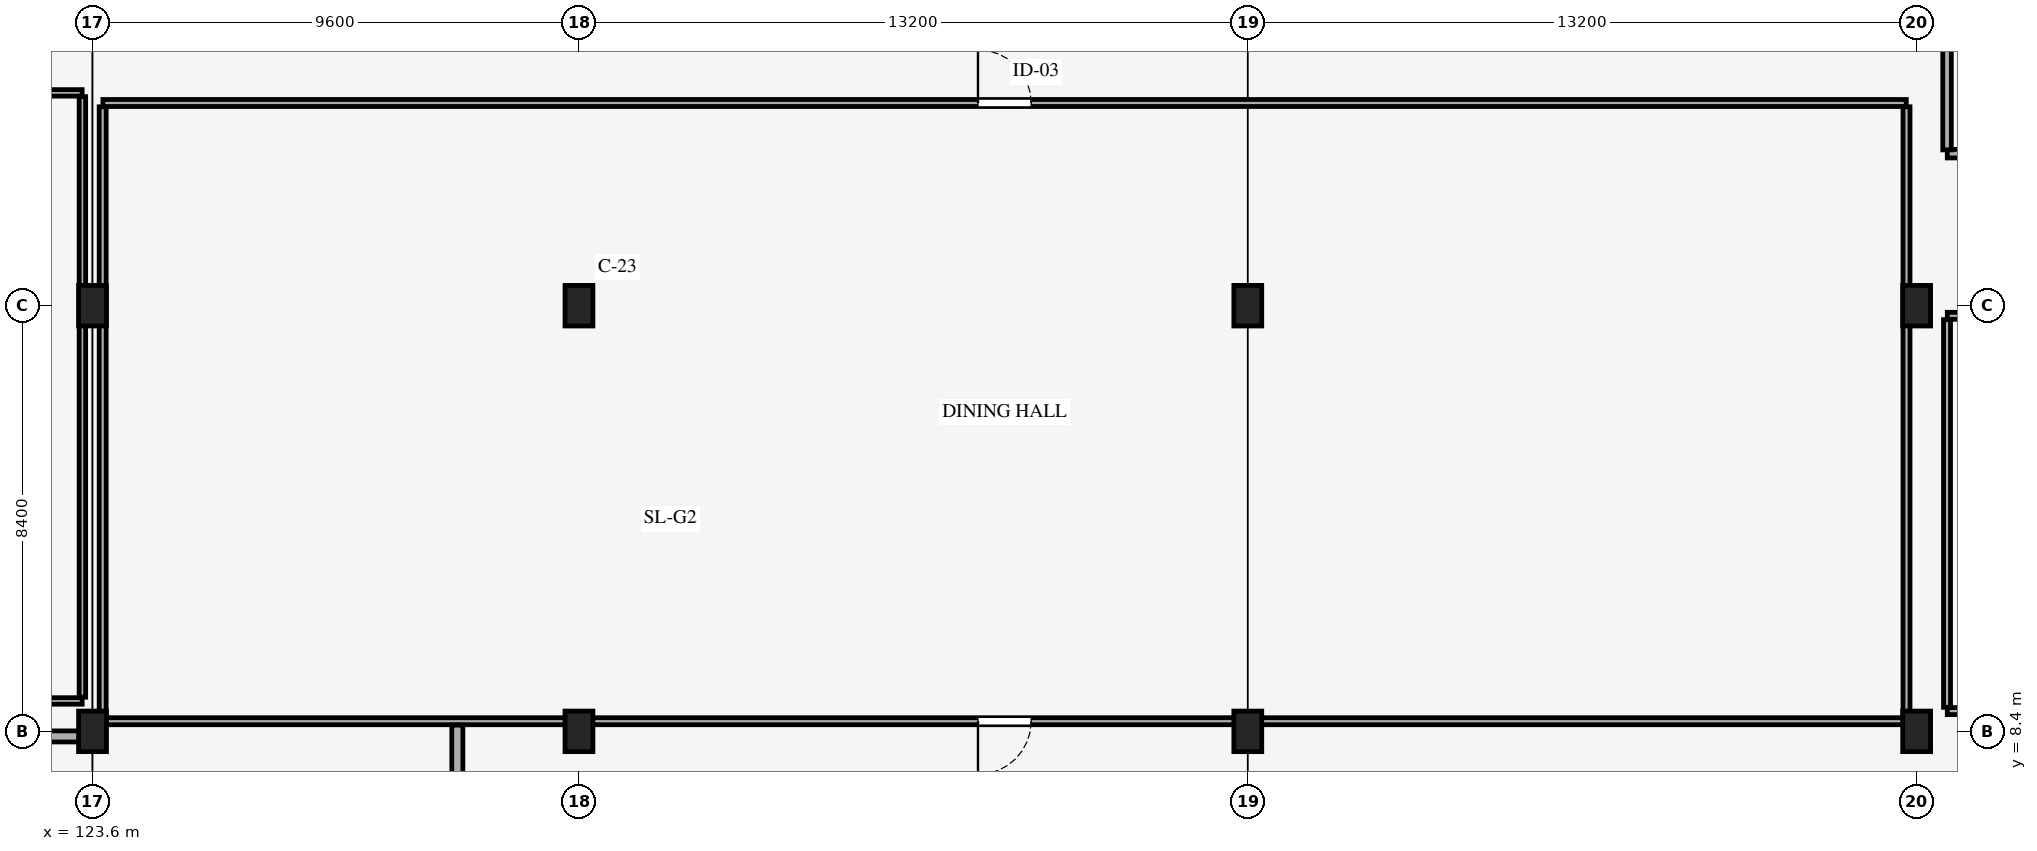
"""IFC4 building model, lengths in metres.
Left out: names, types, materials, properties, quantities, classifications, styles, units other than length and angle.
Written with IfcOpenShell. Run it as: python <this file> out.ifc"""

import sys

from ifc_helpers import new_model, si_unit, direction, frame, frame_2d, origin, origin_2d, place, context, subcontext, project, spatial, rectangle, extrude, element, fill, save


model = new_model("IFC4")
c1 = context("Model", 3, precision=1e-05, world=origin(), true_north=direction((0.0, 1.0)))
c2 = subcontext(c1, "Body", "Model", "MODEL_VIEW")
j1 = project(units=[si_unit("LENGTHUNIT", "METRE"), si_unit("PLANEANGLEUNIT", "RADIAN")], contexts=[c1])
p1 = place(None, origin())
s1 = spatial("IfcSite", under=j1, at=p1, CompositionType="ELEMENT")
p2 = place(p1, origin())
s2 = spatial("IfcBuilding", under=s1, at=p2, CompositionType="ELEMENT")
p3 = place(p2, origin())
s3 = spatial("IfcBuildingStorey", under=s2, at=p3, CompositionType="ELEMENT", Elevation=0.0)
for number, where, z_axis, x_axis in (
    (1, (123.6, 8.4, 0.0), (0.0, 0.0, 1.0), (1.0, 0.0, 0.0)),
    (2, (123.6, 16.8, 0.0), (0.0, 0.0, 1.0), (1.0, 0.0, 0.0)),
    (3, (133.2, 8.4, 0.0), (0.0, 0.0, 1.0), (1.0, 0.0, 0.0)),
    (4, (133.2, 16.8, 0.0), (0.0, 0.0, 1.0), (1.0, 0.0, 0.0)),
    (5, (146.4, 8.4, 0.0), (0.0, 0.0, 1.0), (1.0, 0.0, 0.0)),
    (6, (146.4, 16.8, 0.0), (0.0, 0.0, 1.0), (1.0, 0.0, 0.0)),
    (7, (159.6, 8.4, 0.0), (0.0, 0.0, 1.0), (1.0, 0.0, 0.0)),
    (8, (159.6, 16.8, 0.0), (0.0, 0.0, 1.0), (1.0, 0.0, 0.0)),
):
    element("IfcColumn", number, at=place(p3, frame(where, z_axis=z_axis, x_axis=x_axis)), inside=s3, PredefinedType="COLUMN", context=c2, shape_type="SweptSolid", body=[
        extrude(rectangle(XDim=0.55, YDim=0.8, at=origin_2d()), origin(), (0.0, 0.0, 1.0), 4.8),
    ])
p4 = place(p3, frame((117.287, 21.0, 0.0), z_axis=(0.0, 0.0, 1.0), x_axis=(1.0, 0.0, 0.0)))
e9 = element("IfcWall", 9, at=p4, inside=s3, PredefinedType="STANDARD", context=c2, shape_type="SweptSolid", body=[
    extrude(rectangle(XDim=6.108, YDim=0.128, at=frame_2d((3.054, 0.0))), origin(), (0.0, 0.0, 1.0), 3.62),
])
p5 = place(p4, frame((2.454, 0.0, 0.0)))
e10 = element("IfcOpeningElement", 10, at=p5, cuts=e9, PredefinedType="OPENING", context=c2, shape_type="SweptSolid", body=[
    extrude(rectangle(XDim=1.2, YDim=2.18, at=frame_2d((0.6, 1.09))), frame((0.0, 0.074, 0.0), z_axis=(0.0, -1.0, 0.0), x_axis=(1.0, 0.0, 0.0)), (0.0, 0.0, 1.0), 0.148),
])
p6 = place(p3, frame((123.4, 20.925, 0.0), z_axis=(0.0, 0.0, 1.0), x_axis=(0.0, -1.0, 0.0)))
e11 = element("IfcWall", 11, at=p6, inside=s3, PredefinedType="STANDARD", context=c2, shape_type="SweptSolid", body=[
    extrude(rectangle(XDim=11.85, YDim=0.128, at=frame_2d((5.925, 0.0))), origin(), (0.0, 0.0, 1.0), 3.62),
])
p7 = place(p3, frame((123.395, 9.0, 0.0), z_axis=(0.0, 0.0, 1.0), x_axis=(-1.0, 0.0, 0.0)))
e12 = element("IfcWall", 12, at=p7, inside=s3, PredefinedType="STANDARD", context=c2, shape_type="SweptSolid", body=[
    extrude(rectangle(XDim=17.39, YDim=0.128, at=frame_2d((8.695, 0.0))), origin(), (0.0, 0.0, 1.0), 4.02),
])
p8 = place(p3, frame((159.395, 8.6, 0.0), z_axis=(0.0, 0.0, 1.0), x_axis=(-1.0, 0.0, 0.0)))
e13 = element("IfcWall", 13, at=p8, inside=s3, PredefinedType="STANDARD", context=c2, shape_type="SweptSolid", body=[
    extrude(rectangle(XDim=35.59, YDim=0.138, at=frame_2d((17.795, 0.0))), origin(), (0.0, 0.0, 1.0), 3.27),
])
p9 = place(p8, frame((17.27, 0.0, 0.0)))
e14 = element("IfcOpeningElement", 14, at=p9, cuts=e13, PredefinedType="OPENING", context=c2, shape_type="SweptSolid", body=[
    extrude(rectangle(XDim=1.05, YDim=2.15, at=frame_2d((0.525, 1.075))), frame((0.0, 0.079, 0.0), z_axis=(0.0, -1.0, 0.0), x_axis=(1.0, 0.0, 0.0)), (0.0, 0.0, 1.0), 0.158),
])
p10 = place(p3, frame((123.8, 8.675, 0.0), z_axis=(0.0, 0.0, 1.0), x_axis=(0.0, 1.0, 0.0)))
e15 = element("IfcWall", 15, at=p10, inside=s3, PredefinedType="STANDARD", context=c2, shape_type="SweptSolid", body=[
    extrude(rectangle(XDim=12.05, YDim=0.138, at=frame_2d((6.025, 0.0))), origin(), (0.0, 0.0, 1.0), 3.62),
])
p11 = place(p3, frame((123.805, 20.8, 0.0), z_axis=(0.0, 0.0, 1.0), x_axis=(1.0, 0.0, 0.0)))
e16 = element("IfcWall", 16, at=p11, inside=s3, PredefinedType="STANDARD", context=c2, shape_type="SweptSolid", body=[
    extrude(rectangle(XDim=35.59, YDim=0.138, at=frame_2d((17.795, 0.0))), origin(), (0.0, 0.0, 1.0), 3.62),
])
p12 = place(p11, frame((17.27, 0.0, 0.0)))
e17 = element("IfcOpeningElement", 17, at=p12, cuts=e16, PredefinedType="OPENING", context=c2, shape_type="SweptSolid", body=[
    extrude(rectangle(XDim=1.05, YDim=2.15, at=frame_2d((0.525, 1.075))), frame((0.0, 0.079, 0.0), z_axis=(0.0, -1.0, 0.0), x_axis=(1.0, 0.0, 0.0)), (0.0, 0.0, 1.0), 0.158),
])
p13 = place(p3, frame((159.4, 20.725, 0.0), z_axis=(0.0, 0.0, 1.0), x_axis=(0.0, -1.0, 0.0)))
e18 = element("IfcWall", 18, at=p13, inside=s3, PredefinedType="STANDARD", context=c2, shape_type="SweptSolid", body=[
    extrude(rectangle(XDim=12.05, YDim=0.138, at=frame_2d((6.025, 0.0))), origin(), (0.0, 0.0, 1.0), 3.27),
])
p14 = place(p3, frame((130.8, 8.523, 0.0), z_axis=(0.0, 0.0, 1.0), x_axis=(0.0, -1.0, 0.0)))
e19 = element("IfcWall", 19, at=p14, inside=s3, PredefinedType="STANDARD", context=c2, shape_type="SweptSolid", body=[
    extrude(rectangle(XDim=8.048, YDim=0.218, at=frame_2d((4.024, 0.0))), origin(), (0.0, 0.0, 1.0), 3.62),
])
p15 = place(p14, frame((1.463, 0.0, 0.0)))
e20 = element("IfcOpeningElement", 20, at=p15, cuts=e19, PredefinedType="OPENING", context=c2, shape_type="SweptSolid", body=[
    extrude(rectangle(XDim=1.4, YDim=2.2, at=frame_2d((0.7, 1.1))), frame((0.0, 0.119, 0.0), z_axis=(0.0, -1.0, 0.0), x_axis=(1.0, 0.0, 0.0)), (0.0, 0.0, 1.0), 0.238),
])
p16 = place(p3, frame((106.005, 8.3, 0.0), z_axis=(0.0, 0.0, 1.0), x_axis=(1.0, 0.0, 0.0)))
e21 = element("IfcWall", 21, at=p16, inside=s3, PredefinedType="STANDARD", context=c2, shape_type="SweptSolid", body=[
    extrude(rectangle(XDim=17.795, YDim=0.218, at=frame_2d((8.897, 0.0))), origin(), (0.0, 0.0, 1.0), 2.98),
])
p17 = place(p3, frame((169.795, 8.8, 0.0), z_axis=(0.0, 0.0, 1.0), x_axis=(-1.0, 0.0, 0.0)))
e22 = element("IfcWall", 22, at=p17, inside=s3, PredefinedType="STANDARD", context=c2, shape_type="SweptSolid", body=[
    extrude(rectangle(XDim=9.59, YDim=0.138, at=frame_2d((4.795, 0.0))), origin(), (0.0, 0.0, 1.0), 4.49),
])
p18 = place(p17, frame((4.27, 0.0, 0.0)))
e23 = element("IfcOpeningElement", 23, at=p18, cuts=e22, PredefinedType="OPENING", context=c2, shape_type="SweptSolid", body=[
    extrude(rectangle(XDim=1.05, YDim=2.15, at=frame_2d((0.525, 1.075))), frame((0.0, 0.079, 0.0), z_axis=(0.0, -1.0, 0.0), x_axis=(1.0, 0.0, 0.0)), (0.0, 0.0, 1.0), 0.158),
])
p19 = place(p3, frame((160.2, 8.875, 0.0), z_axis=(0.0, 0.0, 1.0), x_axis=(0.0, 1.0, 0.0)))
e24 = element("IfcWall", 24, at=p19, inside=s3, PredefinedType="STANDARD", context=c2, shape_type="SweptSolid", body=[
    extrude(rectangle(XDim=7.65, YDim=0.138, at=frame_2d((3.825, 0.0))), origin(), (0.0, 0.0, 1.0), 4.49),
])
p20 = place(p3, frame((160.205, 16.6, 0.0), z_axis=(0.0, 0.0, 1.0), x_axis=(1.0, 0.0, 0.0)))
e25 = element("IfcWall", 25, at=p20, inside=s3, PredefinedType="STANDARD", context=c2, shape_type="SweptSolid", body=[
    extrude(rectangle(XDim=9.59, YDim=0.138, at=frame_2d((4.795, 0.0))), origin(), (0.0, 0.0, 1.0), 4.49),
])
p21 = place(p3, frame((164.195, 19.8, 0.0), z_axis=(0.0, 0.0, 1.0), x_axis=(-1.0, 0.0, 0.0)))
e26 = element("IfcWall", 26, at=p21, inside=s3, PredefinedType="STANDARD", context=c2, shape_type="SweptSolid", body=[
    extrude(rectangle(XDim=3.99, YDim=0.168, at=frame_2d((1.995, 0.0))), origin(), (0.0, 0.0, 1.0), 4.49),
])
p22 = place(p3, frame((160.2, 19.875, 0.0), z_axis=(0.0, 0.0, 1.0), x_axis=(0.0, 1.0, 0.0)))
e27 = element("IfcWall", 27, at=p22, inside=s3, PredefinedType="STANDARD", context=c2, shape_type="SweptSolid", body=[
    extrude(rectangle(XDim=4.85, YDim=0.168, at=frame_2d((2.425, 0.0))), origin(), (0.0, 0.0, 1.0), 4.49),
])
p23 = place(p22, frame((1.975, 0.0, 0.0)))
e28 = element("IfcOpeningElement", 28, at=p23, cuts=e27, PredefinedType="OPENING", context=c2, shape_type="SweptSolid", body=[
    extrude(rectangle(XDim=0.9, YDim=2.1, at=frame_2d((0.45, 1.05))), frame((0.0, 0.094, 0.0), z_axis=(0.0, -1.0, 0.0), x_axis=(1.0, 0.0, 0.0)), (0.0, 0.0, 1.0), 0.188),
])
p24 = place(p9, origin())
e29 = element("IfcDoor", 29, at=p24, inside=s3, OperationType="SINGLE_SWING_RIGHT", PredefinedType="DOOR", context=c2, shape_type="SweptSolid", body=[
    extrude(rectangle(XDim=1.05, YDim=2.15, at=frame_2d((0.525, 1.075))), frame((0.0, 0.025, 0.0), z_axis=(0.0, -1.0, 0.0), x_axis=(1.0, 0.0, 0.0)), (0.0, 0.0, 1.0), 0.05),
])
fill(e14, e29)
p25 = place(p12, origin())
e30 = element("IfcDoor", 30, at=p25, inside=s3, OperationType="SINGLE_SWING_LEFT", PredefinedType="DOOR", context=c2, shape_type="SweptSolid", body=[
    extrude(rectangle(XDim=1.05, YDim=2.15, at=frame_2d((0.525, 1.075))), frame((0.0, 0.025, 0.0), z_axis=(0.0, -1.0, 0.0), x_axis=(1.0, 0.0, 0.0)), (0.0, 0.0, 1.0), 0.05),
])
fill(e17, e30)
save(model, sys.argv[1])
